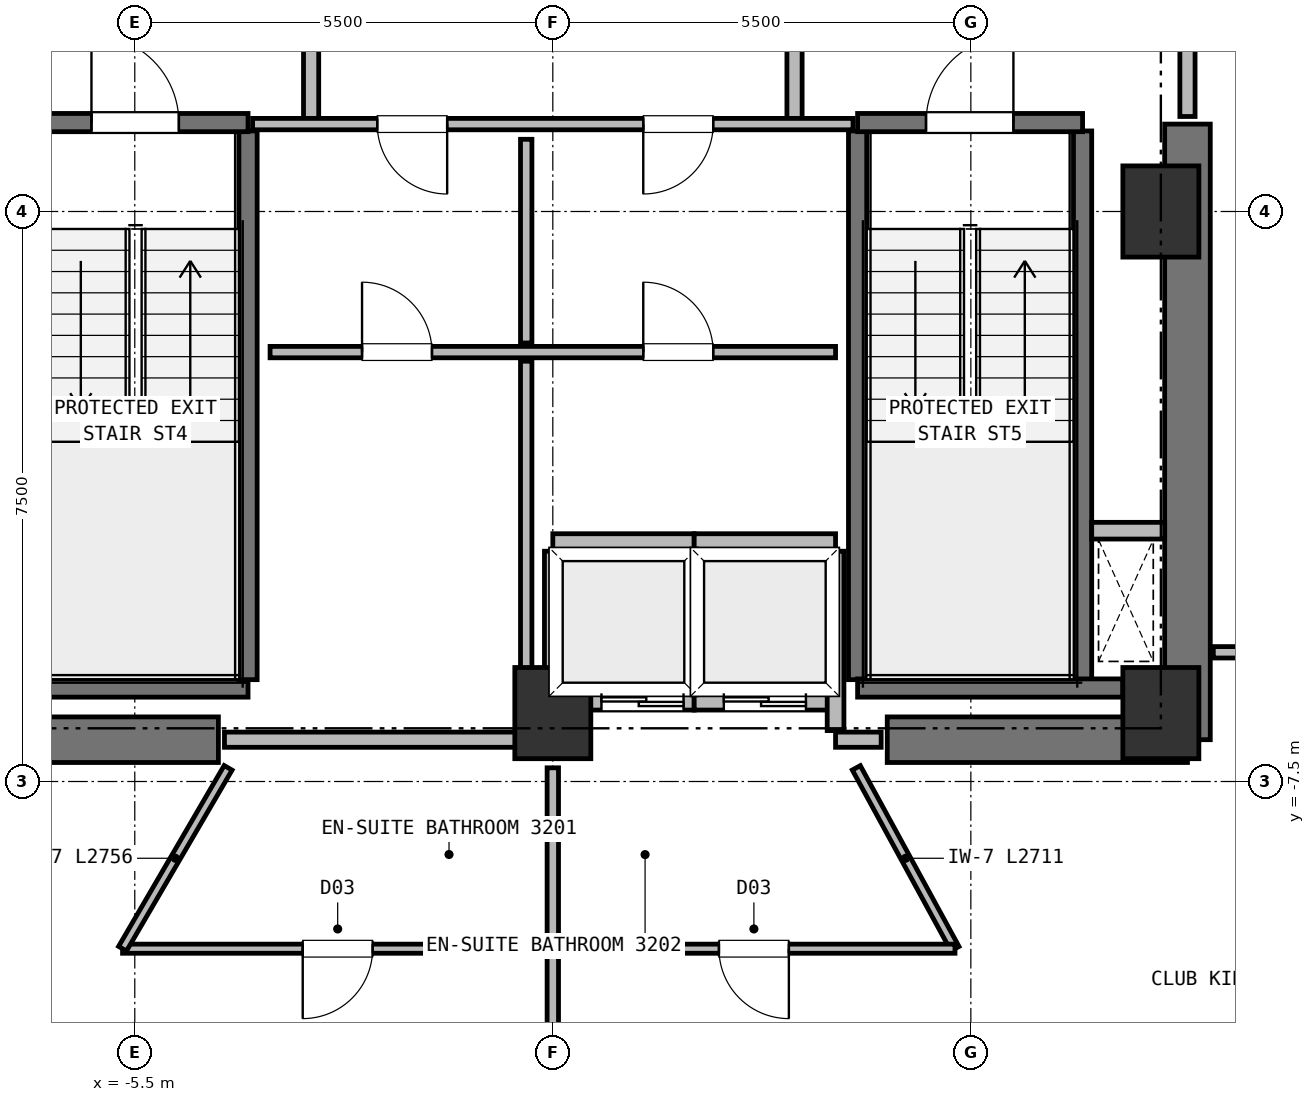
"""IFC4 building model, lengths in metres.
Left out: names, types, materials, properties, quantities, classifications, styles, units other than length and angle.
Written with IfcOpenShell. Run it as: python <this file> out.ifc"""

import sys

from ifc_helpers import new_model, si_unit, direction, frame, frame_2d, origin, origin_2d, place, context, subcontext, project, spatial, rectangle, extrude, element, fill, save


model = new_model("IFC4")
c1 = context("Model", 3, precision=1e-05, world=origin(), true_north=direction((0.0, 1.0)))
c2 = subcontext(c1, "Body", "Model", "MODEL_VIEW")
j1 = project(units=[si_unit("LENGTHUNIT", "METRE"), si_unit("PLANEANGLEUNIT", "RADIAN")], contexts=[c1])
p1 = place(None, origin())
s1 = spatial("IfcSite", under=j1, at=p1, CompositionType="ELEMENT")
p2 = place(p1, origin())
s2 = spatial("IfcBuilding", under=s1, at=p2, CompositionType="ELEMENT")
p3 = place(p2, frame((0.0, 0.0, 119.75)))
s3 = spatial("IfcBuildingStorey", under=s2, at=p3, CompositionType="ELEMENT", Elevation=119.75)
for number, where, z_axis, x_axis in (
    (1, (0.0, -6.6, 0.0), (0.0, 0.0, 1.0), (1.0, 0.0, 0.0)),
    (2, (8.0, -6.6, 0.0), (0.0, 0.0, 1.0), (1.0, 0.0, 0.0)),
    (3, (8.0, 0.0, 0.0), (0.0, 0.0, 1.0), (1.0, 0.0, 0.0)),
):
    element("IfcColumn", number, at=place(p3, frame(where, z_axis=z_axis, x_axis=x_axis)), inside=s3, PredefinedType="COLUMN", context=c2, shape_type="SweptSolid", body=[
        extrude(rectangle(XDim=1.0, YDim=1.2, at=origin_2d()), origin(), (0.0, 0.0, 1.0), 3.75),
    ])
for number, where, z_axis, x_axis in (
    (4, (-8.35, -6.95, 0.0), (0.0, 0.0, 1.0), (1.0, 0.0, 0.0)),
    (5, (4.4, -6.95, 0.0), (0.0, 0.0, 1.0), (1.0, 0.0, 0.0)),
):
    element("IfcWall", number, at=place(p3, frame(where, z_axis=z_axis, x_axis=x_axis)), inside=s3, PredefinedType="SHEAR", context=c2, shape_type="SweptSolid", body=[
        extrude(rectangle(XDim=3.95, YDim=0.6, at=frame_2d((1.975, 0.0))), origin(), (0.0, 0.0, 1.0), 3.5),
    ])
p4 = place(p3, frame((8.35, -6.95, 0.0), z_axis=(0.0, 0.0, 1.0), x_axis=(0.0, 1.0, 0.0)))
e6 = element("IfcWall", 6, at=p4, inside=s3, PredefinedType="SHEAR", context=c2, shape_type="SweptSolid", body=[
    extrude(rectangle(XDim=8.1, YDim=0.6, at=frame_2d((4.05, 0.0))), origin(), (0.0, 0.0, 1.0), 3.5),
])
p5 = place(p3, frame((-7.5, -6.27, 0.0), z_axis=(0.0, 0.0, 1.0), x_axis=(1.0, 0.0, 0.0)))
e7 = element("IfcWall", 7, at=p5, inside=s3, PredefinedType="SHEAR", context=c2, shape_type="SweptSolid", body=[
    extrude(rectangle(XDim=3.49, YDim=0.24, at=frame_2d((1.745, 0.0))), origin(), (0.0, 0.0, 1.0), 3.5),
])
p6 = place(p3, frame((-4.01, -6.16, 0.0), z_axis=(0.0, 0.0, 1.0), x_axis=(0.0, 1.0, 0.0)))
e8 = element("IfcWall", 8, at=p6, inside=s3, PredefinedType="SHEAR", context=c2, shape_type="SweptSolid", body=[
    extrude(rectangle(XDim=7.22, YDim=0.24, at=frame_2d((3.61, 0.0))), origin(), (0.0, 0.0, 1.0), 3.5),
])
p7 = place(p3, frame((-6.97, 1.17, 0.0), z_axis=(0.0, 0.0, 1.0), x_axis=(1.0, 0.0, 0.0)))
e9 = element("IfcWall", 9, at=p7, inside=s3, PredefinedType="SHEAR", context=c2, shape_type="SweptSolid", body=[
    extrude(rectangle(XDim=2.96, YDim=0.24, at=frame_2d((1.48, 0.0))), origin(), (0.0, 0.0, 1.0), 3.5),
])
p8 = place(p7, frame((0.9, 0.0, 0.0)))
e10 = element("IfcOpeningElement", 10, at=p8, cuts=e9, PredefinedType="OPENING", context=c2, shape_type="SweptSolid", body=[
    extrude(rectangle(XDim=1.15, YDim=2.15, at=frame_2d((0.575, 1.075))), frame((0.0, 0.13, 0.0), z_axis=(0.0, -1.0, 0.0), x_axis=(1.0, 0.0, 0.0)), (0.0, 0.0, 1.0), 0.26),
])
for number, where, z_axis, x_axis in (
    (11, (4.01, -6.16, 0.0), (0.0, 0.0, 1.0), (0.0, 1.0, 0.0)),
    (12, (6.97, -6.16, 0.0), (0.0, 0.0, 1.0), (0.0, 1.0, 0.0)),
):
    element("IfcWall", number, at=place(p3, frame(where, z_axis=z_axis, x_axis=x_axis)), inside=s3, PredefinedType="SHEAR", context=c2, shape_type="SweptSolid", body=[
        extrude(rectangle(XDim=7.22, YDim=0.24, at=frame_2d((3.61, 0.0))), origin(), (0.0, 0.0, 1.0), 3.5),
    ])
p9 = place(p3, frame((4.01, -6.27, 0.0), z_axis=(0.0, 0.0, 1.0), x_axis=(1.0, 0.0, 0.0)))
e13 = element("IfcWall", 13, at=p9, inside=s3, PredefinedType="SHEAR", context=c2, shape_type="SweptSolid", body=[
    extrude(rectangle(XDim=3.49, YDim=0.24, at=frame_2d((1.745, 0.0))), origin(), (0.0, 0.0, 1.0), 3.5),
])
p10 = place(p3, frame((4.01, 1.17, 0.0), z_axis=(0.0, 0.0, 1.0), x_axis=(1.0, 0.0, 0.0)))
e14 = element("IfcWall", 14, at=p10, inside=s3, PredefinedType="SHEAR", context=c2, shape_type="SweptSolid", body=[
    extrude(rectangle(XDim=2.96, YDim=0.24, at=frame_2d((1.48, 0.0))), origin(), (0.0, 0.0, 1.0), 3.5),
])
p11 = place(p10, frame((0.9, 0.0, 0.0)))
e15 = element("IfcOpeningElement", 15, at=p11, cuts=e14, PredefinedType="OPENING", context=c2, shape_type="SweptSolid", body=[
    extrude(rectangle(XDim=1.15, YDim=2.15, at=frame_2d((0.575, 1.075))), frame((0.0, 0.13, 0.0), z_axis=(0.0, -1.0, 0.0), x_axis=(1.0, 0.0, 0.0)), (0.0, 0.0, 1.0), 0.26),
])
p12 = place(p3, frame((7.09, -4.2, 0.0), z_axis=(0.0, 0.0, 1.0), x_axis=(1.0, 0.0, 0.0)))
e16 = element("IfcWall", 16, at=p12, inside=s3, PredefinedType="PARTITIONING", context=c2, shape_type="SweptSolid", body=[
    extrude(rectangle(XDim=0.96, YDim=0.22, at=frame_2d((0.48, 0.0))), origin(), (0.0, 0.0, 1.0), 3.5),
])
p13 = place(p3, frame((0.0, -6.45, 0.0), z_axis=(0.0, 0.0, 1.0), x_axis=(1.0, 0.0, 0.0)))
e17 = element("IfcWall", 17, at=p13, inside=s3, PredefinedType="PARTITIONING", context=c2, shape_type="SweptSolid", body=[
    extrude(rectangle(XDim=1.86, YDim=0.22, at=frame_2d((0.93, 0.0))), origin(), (0.0, 0.0, 1.0), 3.12),
])
p14 = place(p13, frame((0.64, 0.0, 0.0)))
e18 = element("IfcOpeningElement", 18, at=p14, cuts=e17, PredefinedType="OPENING", context=c2, shape_type="SweptSolid", body=[
    extrude(rectangle(XDim=1.08, YDim=2.15, at=frame_2d((0.54, 1.075))), frame((0.0, 0.12, 0.0), z_axis=(0.0, -1.0, 0.0), x_axis=(1.0, 0.0, 0.0)), (0.0, 0.0, 1.0), 0.24),
])
for number, where, z_axis, x_axis in (
    (19, (0.0, -4.35, 0.0), (0.0, 0.0, 1.0), (1.0, 0.0, 0.0)),
    (20, (0.0, -6.33, 0.0), (0.0, 0.0, 1.0), (0.0, 1.0, 0.0)),
    (21, (1.86, -6.33, 0.0), (0.0, 0.0, 1.0), (0.0, 1.0, 0.0)),
):
    element("IfcWall", number, at=place(p3, frame(where, z_axis=z_axis, x_axis=x_axis)), inside=s3, PredefinedType="PARTITIONING", context=c2, shape_type="SweptSolid", body=[
        extrude(rectangle(XDim=1.86, YDim=0.22, at=frame_2d((0.93, 0.0))), origin(), (0.0, 0.0, 1.0), 3.5),
    ])
p15 = place(p3, frame((1.86, -6.45, 0.0), z_axis=(0.0, 0.0, 1.0), x_axis=(1.0, 0.0, 0.0)))
e22 = element("IfcWall", 22, at=p15, inside=s3, PredefinedType="PARTITIONING", context=c2, shape_type="SweptSolid", body=[
    extrude(rectangle(XDim=1.86, YDim=0.22, at=frame_2d((0.93, 0.0))), origin(), (0.0, 0.0, 1.0), 3.12),
])
p16 = place(p15, frame((0.39, 0.0, 0.0)))
e23 = element("IfcOpeningElement", 23, at=p16, cuts=e22, PredefinedType="OPENING", context=c2, shape_type="SweptSolid", body=[
    extrude(rectangle(XDim=1.08, YDim=2.15, at=frame_2d((0.54, 1.075))), frame((0.0, 0.12, 0.0), z_axis=(0.0, -1.0, 0.0), x_axis=(1.0, 0.0, 0.0)), (0.0, 0.0, 1.0), 0.24),
])
p17 = place(p3, frame((1.86, -4.35, 0.0), z_axis=(0.0, 0.0, 1.0), x_axis=(1.0, 0.0, 0.0)))
e24 = element("IfcWall", 24, at=p17, inside=s3, PredefinedType="PARTITIONING", context=c2, shape_type="SweptSolid", body=[
    extrude(rectangle(XDim=1.86, YDim=0.22, at=frame_2d((0.93, 0.0))), origin(), (0.0, 0.0, 1.0), 3.5),
])
p18 = place(p3, frame((3.72, -6.83, 0.0), z_axis=(0.0, 0.0, 1.0), x_axis=(0.0, 1.0, 0.0)))
e25 = element("IfcWall", 25, at=p18, inside=s3, PredefinedType="PARTITIONING", context=c2, shape_type="SweptSolid", body=[
    extrude(rectangle(XDim=2.36, YDim=0.22, at=frame_2d((1.18, 0.0))), origin(), (0.0, 0.0, 1.0), 3.5),
])
p19 = place(p3, frame((-3.18, 1.15, 0.0), z_axis=(0.0, 0.0, 1.0), x_axis=(0.0, 1.0, 0.0)))
e26 = element("IfcWall", 26, at=p19, inside=s3, PredefinedType="PARTITIONING", context=c2, shape_type="SweptSolid", body=[
    extrude(rectangle(XDim=3.3, YDim=0.2, at=frame_2d((1.65, 0.0))), origin(), (0.0, 0.0, 1.0), 3.5),
])
p20 = place(p19, frame((1.08, 0.0, 0.0)))
e27 = element("IfcOpeningElement", 27, at=p20, cuts=e26, PredefinedType="OPENING", context=c2, shape_type="SweptSolid", body=[
    extrude(rectangle(XDim=1.15, YDim=2.15, at=frame_2d((0.575, 1.075))), frame((0.0, 0.11, 0.0), z_axis=(0.0, -1.0, 0.0), x_axis=(1.0, 0.0, 0.0)), (0.0, 0.0, 1.0), 0.22),
])
p21 = place(p3, frame((3.18, 1.15, 0.0), z_axis=(0.0, 0.0, 1.0), x_axis=(0.0, 1.0, 0.0)))
e28 = element("IfcWall", 28, at=p21, inside=s3, PredefinedType="PARTITIONING", context=c2, shape_type="SweptSolid", body=[
    extrude(rectangle(XDim=3.3, YDim=0.2, at=frame_2d((1.65, 0.0))), origin(), (0.0, 0.0, 1.0), 3.5),
])
p22 = place(p21, frame((1.08, 0.0, 0.0)))
e29 = element("IfcOpeningElement", 29, at=p22, cuts=e28, PredefinedType="OPENING", context=c2, shape_type="SweptSolid", body=[
    extrude(rectangle(XDim=1.15, YDim=2.15, at=frame_2d((0.575, 1.075))), frame((0.0, 0.11, 0.0), z_axis=(0.0, -1.0, 0.0), x_axis=(1.0, 0.0, 0.0)), (0.0, 0.0, 1.0), 0.22),
])
p23 = place(p3, frame((8.35, 1.25, 0.0), z_axis=(0.0, 0.0, 1.0), x_axis=(0.0, 1.0, 0.0)))
e30 = element("IfcWall", 30, at=p23, inside=s3, PredefinedType="PARTITIONING", context=c2, shape_type="SweptSolid", body=[
    extrude(rectangle(XDim=5.3, YDim=0.2, at=frame_2d((2.65, 0.0))), origin(), (0.0, 0.0, 1.0), 3.5),
])
p24 = place(p23, frame((0.95, 0.0, 0.0)))
e31 = element("IfcOpeningElement", 31, at=p24, cuts=e30, PredefinedType="OPENING", context=c2, shape_type="SweptSolid", body=[
    extrude(rectangle(XDim=1.15, YDim=2.15, at=frame_2d((0.575, 1.075))), frame((0.0, 0.11, 0.0), z_axis=(0.0, -1.0, 0.0), x_axis=(1.0, 0.0, 0.0)), (0.0, 0.0, 1.0), 0.22),
])
p25 = place(p3, frame((3.95, 1.15, 0.0), z_axis=(0.0, 0.0, 1.0), x_axis=(-1.0, 0.0, 0.0)))
e32 = element("IfcWall", 32, at=p25, inside=s3, PredefinedType="PARTITIONING", context=c2, shape_type="SweptSolid", body=[
    extrude(rectangle(XDim=7.9, YDim=0.15, at=frame_2d((3.95, 0.0))), origin(), (0.0, 0.0, 1.0), 3.5),
])
p26 = place(p25, frame((5.34, 0.0, 0.0)))
e33 = element("IfcOpeningElement", 33, at=p26, cuts=e32, PredefinedType="OPENING", context=c2, shape_type="SweptSolid", body=[
    extrude(rectangle(XDim=0.92, YDim=2.05, at=frame_2d((0.46, 1.025))), frame((0.0, 0.085, 0.0), z_axis=(0.0, -1.0, 0.0), x_axis=(1.0, 0.0, 0.0)), (0.0, 0.0, 1.0), 0.17),
])
p27 = place(p25, frame((1.84, 0.0, 0.0)))
e34 = element("IfcOpeningElement", 34, at=p27, cuts=e32, PredefinedType="OPENING", context=c2, shape_type="SweptSolid", body=[
    extrude(rectangle(XDim=0.92, YDim=2.05, at=frame_2d((0.46, 1.025))), frame((0.0, 0.085, 0.0), z_axis=(0.0, -1.0, 0.0), x_axis=(1.0, 0.0, 0.0)), (0.0, 0.0, 1.0), 0.17),
])
p28 = place(p3, frame((-4.32, -6.95, 0.0), z_axis=(0.0, 0.0, 1.0), x_axis=(1.0, 0.0, 0.0)))
e35 = element("IfcWall", 35, at=p28, inside=s3, PredefinedType="PARTITIONING", context=c2, shape_type="SweptSolid", body=[
    extrude(rectangle(XDim=4.32, YDim=0.2, at=frame_2d((2.16, 0.0))), origin(), (0.0, 0.0, 1.0), 3.5),
])
p29 = place(p3, frame((3.72, -6.95, 0.0), z_axis=(0.0, 0.0, 1.0), x_axis=(1.0, 0.0, 0.0)))
e36 = element("IfcWall", 36, at=p29, inside=s3, PredefinedType="PARTITIONING", context=c2, shape_type="SweptSolid", body=[
    extrude(rectangle(XDim=0.6, YDim=0.2, at=frame_2d((0.3, 0.0))), origin(), (0.0, 0.0, 1.0), 3.5),
])
p30 = place(p3, frame((-3.72, -1.85, 0.0), z_axis=(0.0, 0.0, 1.0), x_axis=(1.0, 0.0, 0.0)))
e37 = element("IfcWall", 37, at=p30, inside=s3, PredefinedType="PARTITIONING", context=c2, shape_type="SweptSolid", body=[
    extrude(rectangle(XDim=7.44, YDim=0.15, at=frame_2d((3.72, 0.0))), origin(), (0.0, 0.0, 1.0), 3.5),
])
p31 = place(p30, frame((1.21, 0.0, 0.0)))
e38 = element("IfcOpeningElement", 38, at=p31, cuts=e37, PredefinedType="OPENING", context=c2, shape_type="SweptSolid", body=[
    extrude(rectangle(XDim=0.92, YDim=2.05, at=frame_2d((0.46, 1.025))), frame((0.0, 0.085, 0.0), z_axis=(0.0, -1.0, 0.0), x_axis=(1.0, 0.0, 0.0)), (0.0, 0.0, 1.0), 0.17),
])
p32 = place(p30, frame((4.91, 0.0, 0.0)))
e39 = element("IfcOpeningElement", 39, at=p32, cuts=e37, PredefinedType="OPENING", context=c2, shape_type="SweptSolid", body=[
    extrude(rectangle(XDim=0.92, YDim=2.05, at=frame_2d((0.46, 1.025))), frame((0.0, 0.085, 0.0), z_axis=(0.0, -1.0, 0.0), x_axis=(1.0, 0.0, 0.0)), (0.0, 0.0, 1.0), 0.17),
])
p33 = place(p3, frame((-0.35, -6.58, 0.0), z_axis=(0.0, 0.0, 1.0), x_axis=(0.0, 1.0, 0.0)))
e40 = element("IfcWall", 40, at=p33, inside=s3, PredefinedType="PARTITIONING", context=c2, shape_type="SweptSolid", body=[
    extrude(rectangle(XDim=4.61, YDim=0.15, at=frame_2d((2.305, 0.0))), origin(), (0.0, 0.0, 1.0), 3.5),
])
p34 = place(p3, frame((-0.35, -1.73, 0.0), z_axis=(0.0, 0.0, 1.0), x_axis=(0.0, 1.0, 0.0)))
e41 = element("IfcWall", 41, at=p34, inside=s3, PredefinedType="PARTITIONING", context=c2, shape_type="SweptSolid", body=[
    extrude(rectangle(XDim=2.68, YDim=0.15, at=frame_2d((1.34, 0.0))), origin(), (0.0, 0.0, 1.0), 3.5),
])
p35 = place(p3, frame((10.71, -5.8, 0.0), z_axis=(0.0, 0.0, 1.0), x_axis=(-1.0, 0.0, 0.0)))
e42 = element("IfcWall", 42, at=p35, inside=s3, PredefinedType="PARTITIONING", context=c2, shape_type="SweptSolid", body=[
    extrude(rectangle(XDim=2.02, YDim=0.15, at=frame_2d((1.01, 0.0))), origin(), (0.0, 0.0, 1.0), 3.5),
])
p36 = place(p35, frame((0.52, 0.0, 0.0)))
e43 = element("IfcOpeningElement", 43, at=p36, cuts=e42, PredefinedType="OPENING", context=c2, shape_type="SweptSolid", body=[
    extrude(rectangle(XDim=1.06, YDim=2.15, at=frame_2d((0.53, 1.075))), frame((0.0, 0.085, 0.0), z_axis=(0.0, -1.0, 0.0), x_axis=(1.0, 0.0, 0.0)), (0.0, 0.0, 1.0), 0.17),
])
p37 = place(p3, frame((0.0, -9.7, 0.0), z_axis=(0.0, 0.0, 1.0), x_axis=(-1.0, 0.0, 0.0)))
e44 = element("IfcWall", 44, at=p37, inside=s3, PredefinedType="PARTITIONING", context=c2, shape_type="SweptSolid", body=[
    extrude(rectangle(XDim=5.661, YDim=0.12, at=frame_2d((2.831, 0.0))), origin(), (0.0, 0.0, 1.0), 3.5),
])
p38 = place(p37, frame((2.371, 0.0, 0.0)))
e45 = element("IfcOpeningElement", 45, at=p38, cuts=e44, PredefinedType="OPENING", context=c2, shape_type="SweptSolid", body=[
    extrude(rectangle(XDim=0.92, YDim=2.1, at=frame_2d((0.46, 1.05))), frame((0.0, 0.07, 0.0), z_axis=(0.0, -1.0, 0.0), x_axis=(1.0, 0.0, 0.0)), (0.0, 0.0, 1.0), 0.14),
])
p39 = place(p3, frame((-5.661, -9.7, 0.0), z_axis=(0.0, 0.0, 1.0), x_axis=(0.50404729756, 0.863676051435, 0.0)))
e46 = element("IfcWall", 46, at=p39, inside=s3, PredefinedType="PARTITIONING", context=c2, shape_type="SweptSolid", body=[
    extrude(rectangle(XDim=2.756, YDim=0.12, at=frame_2d((1.378, 0.0))), origin(), (0.0, 0.0, 1.0), 3.5),
])
p40 = place(p3, frame((0.0, -7.32, 0.0), z_axis=(0.0, 0.0, 1.0), x_axis=(0.0, -1.0, 0.0)))
e47 = element("IfcWall", 47, at=p40, inside=s3, PredefinedType="PARTITIONING", context=c2, shape_type="SweptSolid", body=[
    extrude(rectangle(XDim=11.303, YDim=0.15, at=frame_2d((5.651, 0.0))), origin(), (0.0, 0.0, 1.0), 3.5),
])
p41 = place(p3, frame((3.993, -7.32, 0.0), z_axis=(0.0, 0.0, 1.0), x_axis=(0.478915225664, -0.877861154527, 0.0)))
e48 = element("IfcWall", 48, at=p41, inside=s3, PredefinedType="PARTITIONING", context=c2, shape_type="SweptSolid", body=[
    extrude(rectangle(XDim=2.711, YDim=0.12, at=frame_2d((1.355, 0.0))), origin(), (0.0, 0.0, 1.0), 3.5),
])
p42 = place(p3, frame((5.291, -9.7, 0.0), z_axis=(0.0, 0.0, 1.0), x_axis=(-1.0, 0.0, 0.0)))
e49 = element("IfcWall", 49, at=p42, inside=s3, PredefinedType="PARTITIONING", context=c2, shape_type="SweptSolid", body=[
    extrude(rectangle(XDim=5.291, YDim=0.12, at=frame_2d((2.646, 0.0))), origin(), (0.0, 0.0, 1.0), 3.5),
])
p43 = place(p42, frame((2.186, 0.0, 0.0)))
e50 = element("IfcOpeningElement", 50, at=p43, cuts=e49, PredefinedType="OPENING", context=c2, shape_type="SweptSolid", body=[
    extrude(rectangle(XDim=0.92, YDim=2.1, at=frame_2d((0.46, 1.05))), frame((0.0, 0.07, 0.0), z_axis=(0.0, -1.0, 0.0), x_axis=(1.0, 0.0, 0.0)), (0.0, 0.0, 1.0), 0.14),
])
p44 = place(p8, origin())
e51 = element("IfcDoor", 51, at=p44, inside=s3, OperationType="SINGLE_SWING_LEFT", PredefinedType="DOOR", context=c2, shape_type="SweptSolid", body=[
    extrude(rectangle(XDim=1.15, YDim=2.15, at=frame_2d((0.575, 1.075))), frame((0.0, 0.025, 0.0), z_axis=(0.0, -1.0, 0.0), x_axis=(1.0, 0.0, 0.0)), (0.0, 0.0, 1.0), 0.05),
])
fill(e10, e51)
p45 = place(p11, origin())
e52 = element("IfcDoor", 52, at=p45, inside=s3, OperationType="SINGLE_SWING_RIGHT", PredefinedType="DOOR", context=c2, shape_type="SweptSolid", body=[
    extrude(rectangle(XDim=1.15, YDim=2.15, at=frame_2d((0.575, 1.075))), frame((0.0, 0.025, 0.0), z_axis=(0.0, -1.0, 0.0), x_axis=(1.0, 0.0, 0.0)), (0.0, 0.0, 1.0), 0.05),
])
fill(e15, e52)
p46 = place(p14, origin())
e53 = element("IfcDoor", 53, at=p46, inside=s3, OperationType="DOUBLE_DOOR_SLIDING", PredefinedType="DOOR", context=c2, shape_type="SweptSolid", body=[
    extrude(rectangle(XDim=1.08, YDim=2.15, at=frame_2d((0.54, 1.075))), frame((0.0, 0.025, 0.0), z_axis=(0.0, -1.0, 0.0), x_axis=(1.0, 0.0, 0.0)), (0.0, 0.0, 1.0), 0.05),
])
fill(e18, e53)
p47 = place(p16, origin())
e54 = element("IfcDoor", 54, at=p47, inside=s3, OperationType="DOUBLE_DOOR_SLIDING", PredefinedType="DOOR", context=c2, shape_type="SweptSolid", body=[
    extrude(rectangle(XDim=1.08, YDim=2.15, at=frame_2d((0.54, 1.075))), frame((0.0, 0.025, 0.0), z_axis=(0.0, -1.0, 0.0), x_axis=(1.0, 0.0, 0.0)), (0.0, 0.0, 1.0), 0.05),
])
fill(e23, e54)
p48 = place(p26, origin())
e55 = element("IfcDoor", 55, at=p48, inside=s3, OperationType="SINGLE_SWING_LEFT", PredefinedType="DOOR", context=c2, shape_type="SweptSolid", body=[
    extrude(rectangle(XDim=0.92, YDim=2.05, at=frame_2d((0.46, 1.025))), frame((0.0, 0.025, 0.0), z_axis=(0.0, -1.0, 0.0), x_axis=(1.0, 0.0, 0.0)), (0.0, 0.0, 1.0), 0.05),
])
fill(e33, e55)
p49 = place(p27, origin())
e56 = element("IfcDoor", 56, at=p49, inside=s3, OperationType="SINGLE_SWING_RIGHT", PredefinedType="DOOR", context=c2, shape_type="SweptSolid", body=[
    extrude(rectangle(XDim=0.92, YDim=2.05, at=frame_2d((0.46, 1.025))), frame((0.0, 0.025, 0.0), z_axis=(0.0, -1.0, 0.0), x_axis=(1.0, 0.0, 0.0)), (0.0, 0.0, 1.0), 0.05),
])
fill(e34, e56)
p50 = place(p31, origin())
e57 = element("IfcDoor", 57, at=p50, inside=s3, OperationType="SINGLE_SWING_LEFT", PredefinedType="DOOR", context=c2, shape_type="SweptSolid", body=[
    extrude(rectangle(XDim=0.92, YDim=2.05, at=frame_2d((0.46, 1.025))), frame((0.0, 0.025, 0.0), z_axis=(0.0, -1.0, 0.0), x_axis=(1.0, 0.0, 0.0)), (0.0, 0.0, 1.0), 0.05),
])
fill(e38, e57)
p51 = place(p32, origin())
e58 = element("IfcDoor", 58, at=p51, inside=s3, OperationType="SINGLE_SWING_LEFT", PredefinedType="DOOR", context=c2, shape_type="SweptSolid", body=[
    extrude(rectangle(XDim=0.92, YDim=2.05, at=frame_2d((0.46, 1.025))), frame((0.0, 0.025, 0.0), z_axis=(0.0, -1.0, 0.0), x_axis=(1.0, 0.0, 0.0)), (0.0, 0.0, 1.0), 0.05),
])
fill(e39, e58)
p52 = place(p38, origin())
e59 = element("IfcDoor", 59, at=p52, inside=s3, OperationType="SINGLE_SWING_RIGHT", PredefinedType="DOOR", context=c2, shape_type="SweptSolid", body=[
    extrude(rectangle(XDim=0.92, YDim=2.1, at=frame_2d((0.46, 1.05))), frame((0.0, 0.025, 0.0), z_axis=(0.0, -1.0, 0.0), x_axis=(1.0, 0.0, 0.0)), (0.0, 0.0, 1.0), 0.05),
])
fill(e45, e59)
p53 = place(p43, origin())
e60 = element("IfcDoor", 60, at=p53, inside=s3, OperationType="SINGLE_SWING_LEFT", PredefinedType="DOOR", context=c2, shape_type="SweptSolid", body=[
    extrude(rectangle(XDim=0.92, YDim=2.1, at=frame_2d((0.46, 1.05))), frame((0.0, 0.025, 0.0), z_axis=(0.0, -1.0, 0.0), x_axis=(1.0, 0.0, 0.0)), (0.0, 0.0, 1.0), 0.05),
])
fill(e50, e60)
save(model, sys.argv[1])
